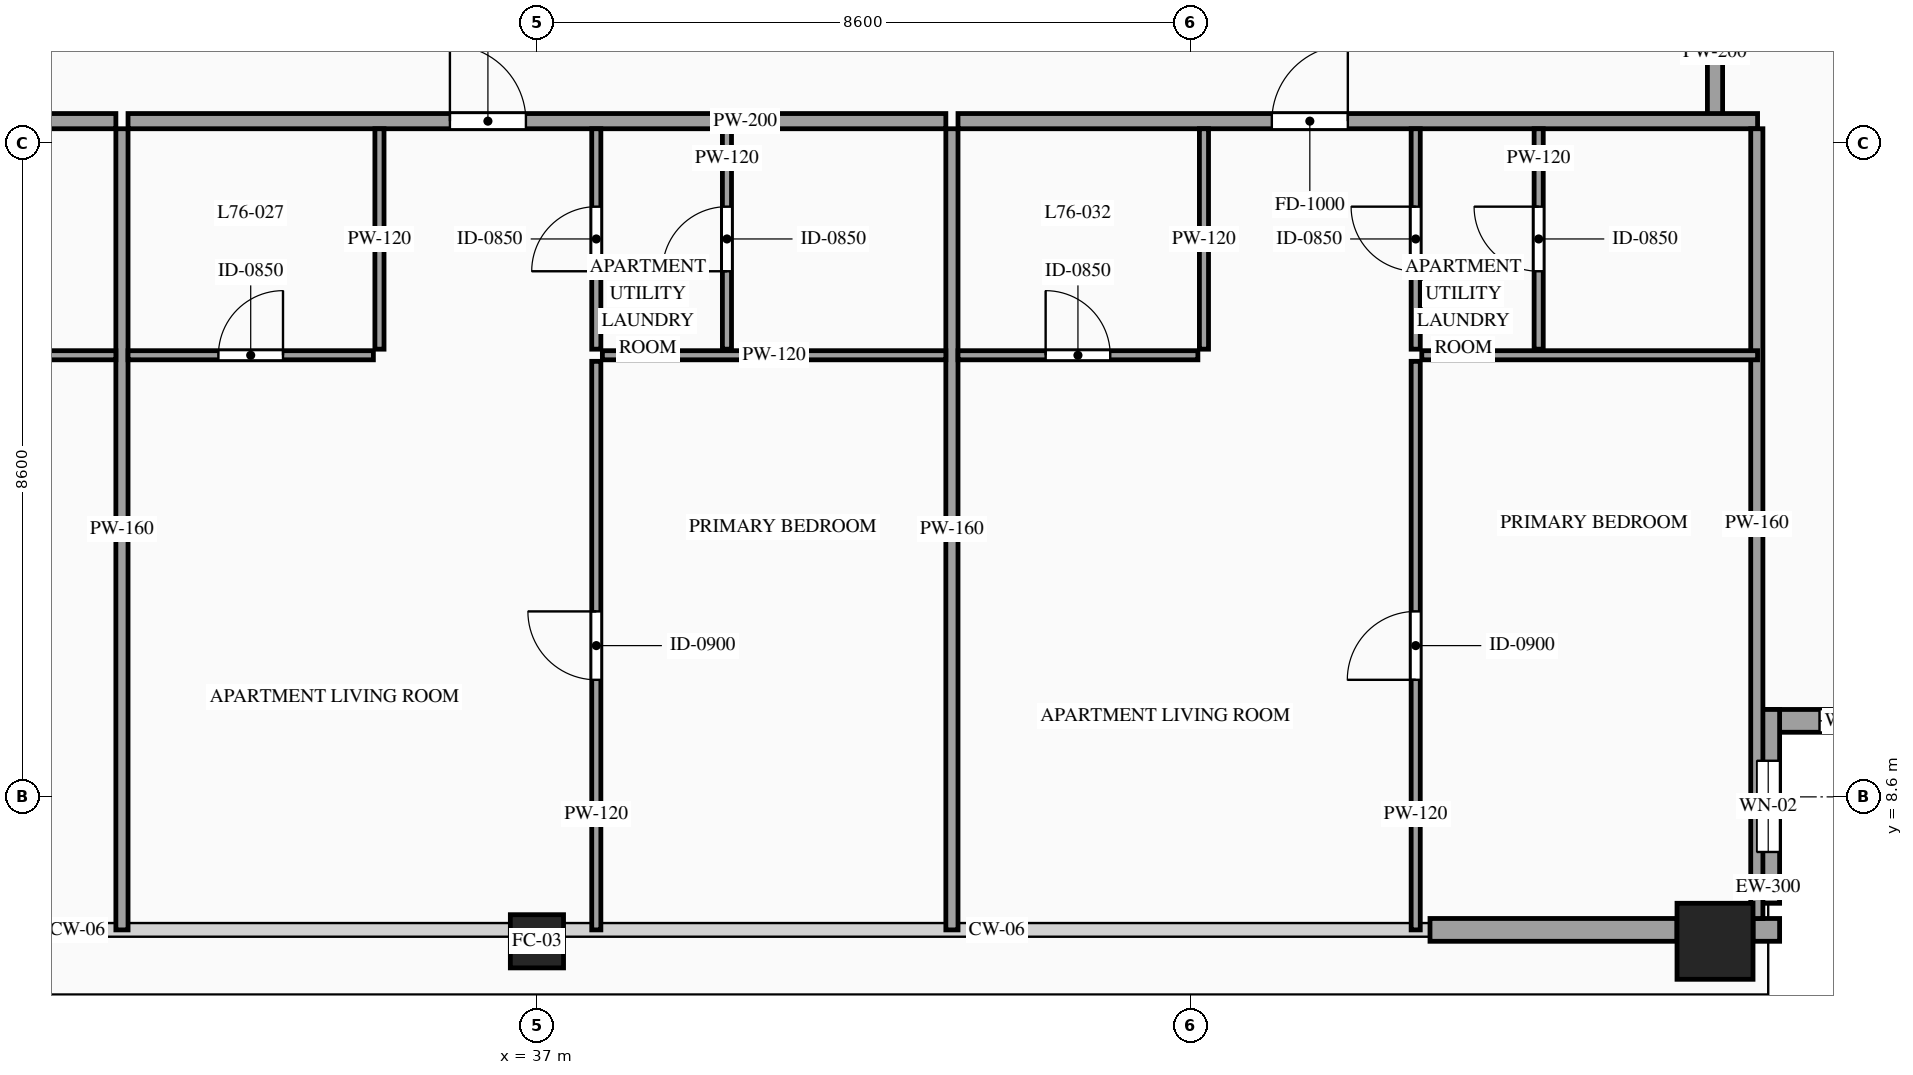
"""IFC4 building model, lengths in metres.
Left out: names, types, materials, properties, quantities, classifications, styles, units other than length and angle.
Written with IfcOpenShell. Run it as: python <this file> out.ifc"""

import sys

from ifc_helpers import new_model, si_unit, direction, frame, frame_2d, origin, origin_2d, place, context, subcontext, project, spatial, rectangle, hollow_rectangle, extrude, source, transform, mapped, element, fill, save


model = new_model("IFC4")
c1 = context("Model", 3, precision=1e-05, world=origin(), true_north=direction((0.0, 1.0)))
c2 = subcontext(c1, "Body", "Model", "MODEL_VIEW")
j1 = project(units=[si_unit("LENGTHUNIT", "METRE"), si_unit("PLANEANGLEUNIT", "RADIAN")], contexts=[c1])
p1 = place(None, origin())
s1 = spatial("IfcSite", under=j1, at=p1, CompositionType="ELEMENT")
p2 = place(p1, origin())
s2 = spatial("IfcBuilding", under=s1, at=p2, CompositionType="ELEMENT")
p3 = place(p2, frame((0.0, 0.0, 285.6)))
s3 = spatial("IfcBuildingStorey", under=s2, at=p3, CompositionType="ELEMENT", Elevation=285.6)
m1 = source(origin(), c2, "Body", "SweptSolid", [
    extrude(hollow_rectangle(XDim=0.7, YDim=0.7, WallThickness=0.032, at=origin_2d()), origin(), (0.0, 0.0, 1.0), 3.5),
])
p4 = place(p3, frame((37.0, 6.7, 0.0), z_axis=(0.0, 0.0, 1.0), x_axis=(1.0, 0.0, 0.0)))
e1 = element("IfcColumn", 1, at=p4, inside=s3, PredefinedType="COLUMN", context=c2, shape_type="MappedRepresentation", body=[
    mapped(m1, transform((0.0, 0.0, 0.0), scale=1.0)),
])
m2 = source(origin(), c2, "Body", "SweptSolid", [
    extrude(hollow_rectangle(XDim=1.0, YDim=1.0, WallThickness=0.048, at=origin_2d()), origin(), (0.0, 0.0, 1.0), 3.5),
])
p5 = place(p3, frame((52.5, 6.7, 0.0), z_axis=(0.0, 0.0, 1.0), x_axis=(1.0, 0.0, 0.0)))
e2 = element("IfcColumn", 2, at=p5, inside=s3, PredefinedType="COLUMN", context=c2, shape_type="MappedRepresentation", body=[
    mapped(m2, transform((0.0, 0.0, 0.0), scale=1.0)),
])
p6 = place(p3, frame((53.05, 9.6, 0.0), z_axis=(0.0, 0.0, 1.0), x_axis=(1.0, 0.0, 0.0)))
e3 = element("IfcWall", 3, at=p6, inside=s3, PredefinedType="SOLIDWALL", context=c2, shape_type="SweptSolid", body=[
    extrude(rectangle(XDim=2.55, YDim=0.3, at=frame_2d((1.275, 0.0))), origin(), (0.0, 0.0, 1.0), 3.28),
])
p7 = place(p6, frame((0.825, 0.0, 0.85)))
e4 = element("IfcOpeningElement", 4, at=p7, cuts=e3, PredefinedType="OPENING", context=c2, shape_type="SweptSolid", body=[
    extrude(rectangle(XDim=0.9, YDim=1.5, at=frame_2d((0.45, 0.75))), frame((0.0, 0.165, 0.0), z_axis=(0.0, -1.0, 0.0), x_axis=(1.0, 0.0, 0.0)), (0.0, 0.0, 1.0), 0.33),
])
p8 = place(p3, frame((53.2, 7.2, 0.0), z_axis=(0.0, 0.0, 1.0), x_axis=(0.0, 1.0, 0.0)))
e5 = element("IfcWall", 5, at=p8, inside=s3, PredefinedType="SOLIDWALL", context=c2, shape_type="SweptSolid", body=[
    extrude(rectangle(XDim=2.55, YDim=0.3, at=frame_2d((1.275, 0.0))), origin(), (0.0, 0.0, 1.0), 3.28),
])
p9 = place(p8, frame((0.675, 0.0, 0.85)))
e6 = element("IfcOpeningElement", 6, at=p9, cuts=e5, PredefinedType="OPENING", context=c2, shape_type="SweptSolid", body=[
    extrude(rectangle(XDim=1.2, YDim=2.1, at=frame_2d((0.6, 1.05))), frame((0.0, 0.165, 0.0), z_axis=(0.0, -1.0, 0.0), x_axis=(1.0, 0.0, 0.0)), (0.0, 0.0, 1.0), 0.33),
])
m3 = source(origin(), c2, "Body", "SweptSolid", [
    extrude(rectangle(XDim=0.35, YDim=0.3, at=frame_2d((0.175, 0.0))), origin(), (0.0, 0.0, 1.0), 3.28),
])
p10 = place(p3, frame((53.0, 6.85, 0.0), z_axis=(0.0, 0.0, 1.0), x_axis=(1.0, 0.0, 0.0)))
e7 = element("IfcWall", 7, at=p10, inside=s3, PredefinedType="SOLIDWALL", context=c2, shape_type="MappedRepresentation", body=[
    mapped(m3, transform((0.0, 0.0, 0.0), scale=1.0)),
])
m4 = source(origin(), c2, "Body", "SweptSolid", [
    extrude(rectangle(XDim=3.25, YDim=0.3, at=frame_2d((1.625, 0.0))), origin(), (0.0, 0.0, 1.0), 2.885),
])
p11 = place(p3, frame((48.75, 6.85, 0.0), z_axis=(0.0, 0.0, 1.0), x_axis=(1.0, 0.0, 0.0)))
e8 = element("IfcWall", 8, at=p11, inside=s3, PredefinedType="SOLIDWALL", context=c2, shape_type="MappedRepresentation", body=[
    mapped(m4, transform((0.0, 0.0, 0.0), scale=1.0)),
])
m5 = source(origin(), c2, "Body", "SweptSolid", [
    extrude(rectangle(XDim=1.7, YDim=0.2, at=frame_2d((0.85, 0.0))), origin(), (0.0, 0.0, 1.0), 3.28),
])
p12 = place(p3, frame((52.5, 17.55, 0.0), z_axis=(0.0, 0.0, 1.0), x_axis=(0.0, 1.0, 0.0)))
e9 = element("IfcWall", 9, at=p12, inside=s3, PredefinedType="PARTITIONING", context=c2, shape_type="MappedRepresentation", body=[
    mapped(m5, transform((0.0, 0.0, 0.0), scale=1.0)),
])
p13 = place(p3, frame((20.94, 17.49, 0.0), z_axis=(0.0, 0.0, 1.0), x_axis=(1.0, 0.0, 0.0)))
e10 = element("IfcWall", 10, at=p13, inside=s3, PredefinedType="PARTITIONING", context=c2, shape_type="SweptSolid", body=[
    extrude(rectangle(XDim=10.52, YDim=0.2, at=frame_2d((5.26, 0.0))), origin(), (0.0, 0.0, 1.0), 3.28),
])
p14 = place(p13, frame((4.129, 0.0, 0.0)))
e11 = element("IfcOpeningElement", 11, at=p14, cuts=e10, PredefinedType="OPENING", context=c2, shape_type="SweptSolid", body=[
    extrude(rectangle(XDim=1.0, YDim=2.2, at=frame_2d((0.5, 1.1))), frame((0.0, 0.115, 0.0), z_axis=(0.0, -1.0, 0.0), x_axis=(1.0, 0.0, 0.0)), (0.0, 0.0, 1.0), 0.23),
])
m6 = source(origin(), c2, "Body", "SweptSolid", [
    extrude(rectangle(XDim=10.54, YDim=0.16, at=frame_2d((5.27, 0.0))), origin(), (0.0, 0.0, 1.0), 3.28),
])
p15 = place(p3, frame((31.54, 6.85, 0.0), z_axis=(0.0, 0.0, 1.0), x_axis=(0.0, 1.0, 0.0)))
e12 = element("IfcWall", 12, at=p15, inside=s3, PredefinedType="PARTITIONING", context=c2, shape_type="MappedRepresentation", body=[
    mapped(m6, transform((0.0, 0.0, 0.0), scale=1.0)),
])
m7 = source(origin(), c2, "Body", "SweptSolid", [
    extrude(rectangle(XDim=4.418, YDim=0.12, at=frame_2d((2.209, 0.0))), origin(), (0.0, 0.0, 1.0), 3.28),
])
p16 = place(p3, frame((27.042, 14.41, 0.0), z_axis=(0.0, 0.0, 1.0), x_axis=(1.0, 0.0, 0.0)))
e13 = element("IfcWall", 13, at=p16, inside=s3, PredefinedType="PARTITIONING", context=c2, shape_type="MappedRepresentation", body=[
    mapped(m7, transform((0.0, 0.0, 0.0), scale=1.0)),
])
p17 = place(p3, frame((31.62, 17.49, 0.0), z_axis=(0.0, 0.0, 1.0), x_axis=(1.0, 0.0, 0.0)))
e14 = element("IfcWall", 14, at=p17, inside=s3, PredefinedType="PARTITIONING", context=c2, shape_type="SweptSolid", body=[
    extrude(rectangle(XDim=10.76, YDim=0.2, at=frame_2d((5.38, 0.0))), origin(), (0.0, 0.0, 1.0), 3.28),
])
p18 = place(p17, frame((4.235, 0.0, 0.0)))
e15 = element("IfcOpeningElement", 15, at=p18, cuts=e14, PredefinedType="OPENING", context=c2, shape_type="SweptSolid", body=[
    extrude(rectangle(XDim=1.0, YDim=2.2, at=frame_2d((0.5, 1.1))), frame((0.0, 0.115, 0.0), z_axis=(0.0, -1.0, 0.0), x_axis=(1.0, 0.0, 0.0)), (0.0, 0.0, 1.0), 0.23),
])
p19 = place(p3, frame((42.46, 6.85, 0.0), z_axis=(0.0, 0.0, 1.0), x_axis=(0.0, 1.0, 0.0)))
e16 = element("IfcWall", 16, at=p19, inside=s3, PredefinedType="PARTITIONING", context=c2, shape_type="MappedRepresentation", body=[
    mapped(m6, transform((0.0, 0.0, 0.0), scale=1.0)),
])
p20 = place(p3, frame((31.62, 14.41, 0.0), z_axis=(0.0, 0.0, 1.0), x_axis=(1.0, 0.0, 0.0)))
e17 = element("IfcWall", 17, at=p20, inside=s3, PredefinedType="PARTITIONING", context=c2, shape_type="SweptSolid", body=[
    extrude(rectangle(XDim=3.228, YDim=0.12, at=frame_2d((1.614, 0.0))), origin(), (0.0, 0.0, 1.0), 3.28),
])
p21 = place(p20, frame((1.189, 0.0, 0.0)))
e18 = element("IfcOpeningElement", 18, at=p21, cuts=e17, PredefinedType="OPENING", context=c2, shape_type="SweptSolid", body=[
    extrude(rectangle(XDim=0.85, YDim=2.1, at=frame_2d((0.425, 1.05))), frame((0.0, 0.075, 0.0), z_axis=(0.0, -1.0, 0.0), x_axis=(1.0, 0.0, 0.0)), (0.0, 0.0, 1.0), 0.15),
])
m8 = source(origin(), c2, "Body", "SweptSolid", [
    extrude(rectangle(XDim=2.9, YDim=0.12, at=frame_2d((1.45, 0.0))), origin(), (0.0, 0.0, 1.0), 3.28),
])
p22 = place(p3, frame((34.928, 14.49, 0.0), z_axis=(0.0, 0.0, 1.0), x_axis=(0.0, 1.0, 0.0)))
e19 = element("IfcWall", 19, at=p22, inside=s3, PredefinedType="PARTITIONING", context=c2, shape_type="MappedRepresentation", body=[
    mapped(m8, transform((0.0, 0.0, 0.0), scale=1.0)),
])
p23 = place(p3, frame((39.5, 14.49, 0.0), z_axis=(0.0, 0.0, 1.0), x_axis=(0.0, 1.0, 0.0)))
e20 = element("IfcWall", 20, at=p23, inside=s3, PredefinedType="PARTITIONING", context=c2, shape_type="SweptSolid", body=[
    extrude(rectangle(XDim=2.9, YDim=0.12, at=frame_2d((1.45, 0.0))), origin(), (0.0, 0.0, 1.0), 3.28),
])
p24 = place(p23, frame((1.025, 0.0, 0.0)))
e21 = element("IfcOpeningElement", 21, at=p24, cuts=e20, PredefinedType="OPENING", context=c2, shape_type="SweptSolid", body=[
    extrude(rectangle(XDim=0.85, YDim=2.1, at=frame_2d((0.425, 1.05))), frame((0.0, 0.075, 0.0), z_axis=(0.0, -1.0, 0.0), x_axis=(1.0, 0.0, 0.0)), (0.0, 0.0, 1.0), 0.15),
])
m9 = source(origin(), c2, "Body", "SweptSolid", [
    extrude(rectangle(XDim=4.519, YDim=0.12, at=frame_2d((2.259, 0.0))), origin(), (0.0, 0.0, 1.0), 3.28),
])
p25 = place(p3, frame((37.861, 14.41, 0.0), z_axis=(0.0, 0.0, 1.0), x_axis=(1.0, 0.0, 0.0)))
e22 = element("IfcWall", 22, at=p25, inside=s3, PredefinedType="PARTITIONING", context=c2, shape_type="MappedRepresentation", body=[
    mapped(m9, transform((0.0, 0.0, 0.0), scale=1.0)),
])
p26 = place(p3, frame((37.781, 6.85, 0.0), z_axis=(0.0, 0.0, 1.0), x_axis=(0.0, 1.0, 0.0)))
e23 = element("IfcWall", 23, at=p26, inside=s3, PredefinedType="PARTITIONING", context=c2, shape_type="SweptSolid", body=[
    extrude(rectangle(XDim=7.48, YDim=0.12, at=frame_2d((3.74, 0.0))), origin(), (0.0, 0.0, 1.0), 3.28),
])
p27 = place(p26, frame((3.29, 0.0, 0.0)))
e24 = element("IfcOpeningElement", 24, at=p27, cuts=e23, PredefinedType="OPENING", context=c2, shape_type="SweptSolid", body=[
    extrude(rectangle(XDim=0.9, YDim=2.15, at=frame_2d((0.45, 1.075))), frame((0.0, 0.075, 0.0), z_axis=(0.0, -1.0, 0.0), x_axis=(1.0, 0.0, 0.0)), (0.0, 0.0, 1.0), 0.15),
])
p28 = place(p3, frame((37.781, 14.49, 0.0), z_axis=(0.0, 0.0, 1.0), x_axis=(0.0, 1.0, 0.0)))
e25 = element("IfcWall", 25, at=p28, inside=s3, PredefinedType="PARTITIONING", context=c2, shape_type="SweptSolid", body=[
    extrude(rectangle(XDim=2.9, YDim=0.12, at=frame_2d((1.45, 0.0))), origin(), (0.0, 0.0, 1.0), 3.28),
])
p29 = place(p28, frame((1.025, 0.0, 0.0)))
e26 = element("IfcOpeningElement", 26, at=p29, cuts=e25, PredefinedType="OPENING", context=c2, shape_type="SweptSolid", body=[
    extrude(rectangle(XDim=0.85, YDim=2.1, at=frame_2d((0.425, 1.05))), frame((0.0, 0.075, 0.0), z_axis=(0.0, -1.0, 0.0), x_axis=(1.0, 0.0, 0.0)), (0.0, 0.0, 1.0), 0.15),
])
p30 = place(p3, frame((42.54, 17.49, 0.0), z_axis=(0.0, 0.0, 1.0), x_axis=(1.0, 0.0, 0.0)))
e27 = element("IfcWall", 27, at=p30, inside=s3, PredefinedType="PARTITIONING", context=c2, shape_type="SweptSolid", body=[
    extrude(rectangle(XDim=10.52, YDim=0.2, at=frame_2d((5.26, 0.0))), origin(), (0.0, 0.0, 1.0), 3.28),
])
p31 = place(p30, frame((4.129, 0.0, 0.0)))
e28 = element("IfcOpeningElement", 28, at=p31, cuts=e27, PredefinedType="OPENING", context=c2, shape_type="SweptSolid", body=[
    extrude(rectangle(XDim=1.0, YDim=2.2, at=frame_2d((0.5, 1.1))), frame((0.0, 0.115, 0.0), z_axis=(0.0, -1.0, 0.0), x_axis=(1.0, 0.0, 0.0)), (0.0, 0.0, 1.0), 0.23),
])
m10 = source(origin(), c2, "Body", "SweptSolid", [
    extrude(rectangle(XDim=10.39, YDim=0.16, at=frame_2d((5.195, 0.0))), origin(), (0.0, 0.0, 1.0), 3.28),
])
p32 = place(p3, frame((53.05, 7.0, 0.0), z_axis=(0.0, 0.0, 1.0), x_axis=(0.0, 1.0, 0.0)))
e29 = element("IfcWall", 29, at=p32, inside=s3, PredefinedType="PARTITIONING", context=c2, shape_type="MappedRepresentation", body=[
    mapped(m10, transform((0.0, 0.0, 0.0), scale=1.0)),
])
p33 = place(p3, frame((42.54, 14.41, 0.0), z_axis=(0.0, 0.0, 1.0), x_axis=(1.0, 0.0, 0.0)))
e30 = element("IfcWall", 30, at=p33, inside=s3, PredefinedType="PARTITIONING", context=c2, shape_type="SweptSolid", body=[
    extrude(rectangle(XDim=3.156, YDim=0.12, at=frame_2d((1.578, 0.0))), origin(), (0.0, 0.0, 1.0), 3.28),
])
p34 = place(p33, frame((1.153, 0.0, 0.0)))
e31 = element("IfcOpeningElement", 31, at=p34, cuts=e30, PredefinedType="OPENING", context=c2, shape_type="SweptSolid", body=[
    extrude(rectangle(XDim=0.85, YDim=2.1, at=frame_2d((0.425, 1.05))), frame((0.0, 0.075, 0.0), z_axis=(0.0, -1.0, 0.0), x_axis=(1.0, 0.0, 0.0)), (0.0, 0.0, 1.0), 0.15),
])
p35 = place(p3, frame((45.776, 14.49, 0.0), z_axis=(0.0, 0.0, 1.0), x_axis=(0.0, 1.0, 0.0)))
e32 = element("IfcWall", 32, at=p35, inside=s3, PredefinedType="PARTITIONING", context=c2, shape_type="MappedRepresentation", body=[
    mapped(m8, transform((0.0, 0.0, 0.0), scale=1.0)),
])
p36 = place(p3, frame((50.18, 14.49, 0.0), z_axis=(0.0, 0.0, 1.0), x_axis=(0.0, 1.0, 0.0)))
e33 = element("IfcWall", 33, at=p36, inside=s3, PredefinedType="PARTITIONING", context=c2, shape_type="SweptSolid", body=[
    extrude(rectangle(XDim=2.9, YDim=0.12, at=frame_2d((1.45, 0.0))), origin(), (0.0, 0.0, 1.0), 2.825),
])
p37 = place(p36, frame((1.025, 0.0, 0.0)))
e34 = element("IfcOpeningElement", 34, at=p37, cuts=e33, PredefinedType="OPENING", context=c2, shape_type="SweptSolid", body=[
    extrude(rectangle(XDim=0.85, YDim=2.1, at=frame_2d((0.425, 1.05))), frame((0.0, 0.075, 0.0), z_axis=(0.0, -1.0, 0.0), x_axis=(1.0, 0.0, 0.0)), (0.0, 0.0, 1.0), 0.15),
])
p38 = place(p3, frame((48.642, 14.41, 0.0), z_axis=(0.0, 0.0, 1.0), x_axis=(1.0, 0.0, 0.0)))
e35 = element("IfcWall", 35, at=p38, inside=s3, PredefinedType="PARTITIONING", context=c2, shape_type="MappedRepresentation", body=[
    mapped(m7, transform((0.0, 0.0, 0.0), scale=1.0)),
])
p39 = place(p3, frame((48.562, 6.85, 0.0), z_axis=(0.0, 0.0, 1.0), x_axis=(0.0, 1.0, 0.0)))
e36 = element("IfcWall", 36, at=p39, inside=s3, PredefinedType="PARTITIONING", context=c2, shape_type="SweptSolid", body=[
    extrude(rectangle(XDim=7.48, YDim=0.12, at=frame_2d((3.74, 0.0))), origin(), (0.0, 0.0, 1.0), 3.28),
])
p40 = place(p39, frame((3.29, 0.0, 0.0)))
e37 = element("IfcOpeningElement", 37, at=p40, cuts=e36, PredefinedType="OPENING", context=c2, shape_type="SweptSolid", body=[
    extrude(rectangle(XDim=0.9, YDim=2.15, at=frame_2d((0.45, 1.075))), frame((0.0, 0.075, 0.0), z_axis=(0.0, -1.0, 0.0), x_axis=(1.0, 0.0, 0.0)), (0.0, 0.0, 1.0), 0.15),
])
p41 = place(p3, frame((48.562, 14.49, 0.0), z_axis=(0.0, 0.0, 1.0), x_axis=(0.0, 1.0, 0.0)))
e38 = element("IfcWall", 38, at=p41, inside=s3, PredefinedType="PARTITIONING", context=c2, shape_type="SweptSolid", body=[
    extrude(rectangle(XDim=2.9, YDim=0.12, at=frame_2d((1.45, 0.0))), origin(), (0.0, 0.0, 1.0), 3.28),
])
p42 = place(p41, frame((1.025, 0.0, 0.0)))
e39 = element("IfcOpeningElement", 39, at=p42, cuts=e38, PredefinedType="OPENING", context=c2, shape_type="SweptSolid", body=[
    extrude(rectangle(XDim=0.85, YDim=2.1, at=frame_2d((0.425, 1.05))), frame((0.0, 0.075, 0.0), z_axis=(0.0, -1.0, 0.0), x_axis=(1.0, 0.0, 0.0)), (0.0, 0.0, 1.0), 0.15),
])
m11 = source(origin(), c2, "Body", "SweptSolid", [
    extrude(rectangle(XDim=0.9, YDim=1.5, at=frame_2d((0.45, 0.75))), frame((0.0, 0.03, 0.0), z_axis=(0.0, -1.0, 0.0), x_axis=(1.0, 0.0, 0.0)), (0.0, 0.0, 1.0), 0.06),
])
p43 = place(p7, origin())
e40 = element("IfcWindow", 40, at=p43, inside=s3, PartitioningType="SINGLE_PANEL", PredefinedType="WINDOW", context=c2, shape_type="MappedRepresentation", body=[
    mapped(m11, transform((0.0, 0.0, 0.0), scale=1.0)),
])
fill(e4, e40)
m12 = source(origin(), c2, "Body", "SweptSolid", [
    extrude(rectangle(XDim=1.2, YDim=2.1, at=frame_2d((0.6, 1.05))), frame((0.0, 0.03, 0.0), z_axis=(0.0, -1.0, 0.0), x_axis=(1.0, 0.0, 0.0)), (0.0, 0.0, 1.0), 0.06),
])
p44 = place(p9, origin())
e41 = element("IfcWindow", 41, at=p44, inside=s3, PartitioningType="SINGLE_PANEL", PredefinedType="WINDOW", context=c2, shape_type="MappedRepresentation", body=[
    mapped(m12, transform((0.0, 0.0, 0.0), scale=1.0)),
])
fill(e6, e41)
m13 = source(origin(), c2, "Body", "SweptSolid", [
    extrude(rectangle(XDim=1.0, YDim=2.2, at=frame_2d((0.5, 1.1))), frame((0.0, 0.025, 0.0), z_axis=(0.0, -1.0, 0.0), x_axis=(1.0, 0.0, 0.0)), (0.0, 0.0, 1.0), 0.05),
])
p45 = place(p18, origin())
e42 = element("IfcDoor", 42, at=p45, inside=s3, OperationType="SINGLE_SWING_LEFT", PredefinedType="DOOR", context=c2, shape_type="MappedRepresentation", body=[
    mapped(m13, transform((0.0, 0.0, 0.0), scale=1.0)),
])
fill(e15, e42)
m14 = source(origin(), c2, "Body", "SweptSolid", [
    extrude(rectangle(XDim=0.85, YDim=2.1, at=frame_2d((0.425, 1.05))), frame((0.0, 0.025, 0.0), z_axis=(0.0, -1.0, 0.0), x_axis=(1.0, 0.0, 0.0)), (0.0, 0.0, 1.0), 0.05),
])
p46 = place(p21, origin())
e43 = element("IfcDoor", 43, at=p46, inside=s3, OperationType="SINGLE_SWING_RIGHT", PredefinedType="DOOR", context=c2, shape_type="MappedRepresentation", body=[
    mapped(m14, transform((0.0, 0.0, 0.0), scale=1.0)),
])
fill(e18, e43)
p47 = place(p24, origin())
e44 = element("IfcDoor", 44, at=p47, inside=s3, OperationType="SINGLE_SWING_LEFT", PredefinedType="DOOR", context=c2, shape_type="MappedRepresentation", body=[
    mapped(m14, transform((0.0, 0.0, 0.0), scale=1.0)),
])
fill(e21, e44)
m15 = source(origin(), c2, "Body", "SweptSolid", [
    extrude(rectangle(XDim=0.9, YDim=2.15, at=frame_2d((0.45, 1.075))), frame((0.0, 0.025, 0.0), z_axis=(0.0, -1.0, 0.0), x_axis=(1.0, 0.0, 0.0)), (0.0, 0.0, 1.0), 0.05),
])
p48 = place(p27, origin())
e45 = element("IfcDoor", 45, at=p48, inside=s3, OperationType="SINGLE_SWING_RIGHT", PredefinedType="DOOR", context=c2, shape_type="MappedRepresentation", body=[
    mapped(m15, transform((0.0, 0.0, 0.0), scale=1.0)),
])
fill(e24, e45)
p49 = place(p29, origin())
e46 = element("IfcDoor", 46, at=p49, inside=s3, OperationType="SINGLE_SWING_LEFT", PredefinedType="DOOR", context=c2, shape_type="MappedRepresentation", body=[
    mapped(m14, transform((0.0, 0.0, 0.0), scale=1.0)),
])
fill(e26, e46)
p50 = place(p31, origin())
e47 = element("IfcDoor", 47, at=p50, inside=s3, OperationType="SINGLE_SWING_RIGHT", PredefinedType="DOOR", context=c2, shape_type="MappedRepresentation", body=[
    mapped(m13, transform((0.0, 0.0, 0.0), scale=1.0)),
])
fill(e28, e47)
p51 = place(p34, origin())
e48 = element("IfcDoor", 48, at=p51, inside=s3, OperationType="SINGLE_SWING_LEFT", PredefinedType="DOOR", context=c2, shape_type="MappedRepresentation", body=[
    mapped(m14, transform((0.0, 0.0, 0.0), scale=1.0)),
])
fill(e31, e48)
p52 = place(p37, origin())
e49 = element("IfcDoor", 49, at=p52, inside=s3, OperationType="SINGLE_SWING_RIGHT", PredefinedType="DOOR", context=c2, shape_type="MappedRepresentation", body=[
    mapped(m14, transform((0.0, 0.0, 0.0), scale=1.0)),
])
fill(e34, e49)
p53 = place(p40, origin())
e50 = element("IfcDoor", 50, at=p53, inside=s3, OperationType="SINGLE_SWING_LEFT", PredefinedType="DOOR", context=c2, shape_type="MappedRepresentation", body=[
    mapped(m15, transform((0.0, 0.0, 0.0), scale=1.0)),
])
fill(e37, e50)
p54 = place(p42, origin())
e51 = element("IfcDoor", 51, at=p54, inside=s3, OperationType="SINGLE_SWING_RIGHT", PredefinedType="DOOR", context=c2, shape_type="MappedRepresentation", body=[
    mapped(m14, transform((0.0, 0.0, 0.0), scale=1.0)),
])
fill(e39, e51)
save(model, sys.argv[1])
